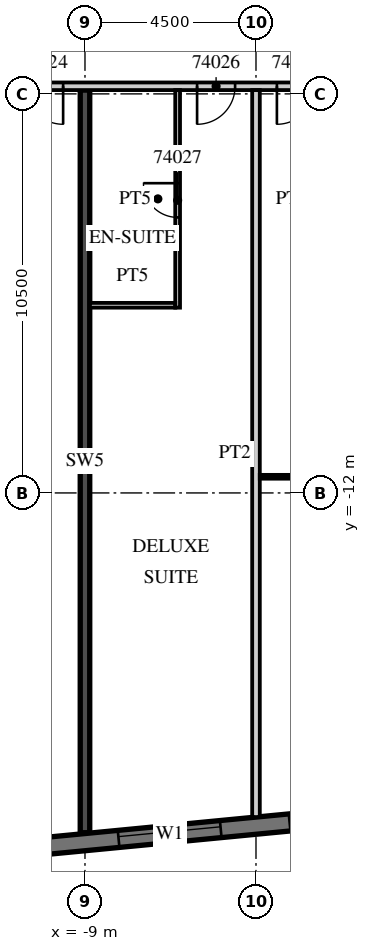
"""IFC4 building model, lengths in metres.
Left out: names, types, materials, properties, quantities, classifications, styles, units other than length and angle.
Written with IfcOpenShell. Run it as: python <this file> out.ifc"""

import sys

from ifc_helpers import new_model, si_unit, direction, frame, frame_2d, origin, place, context, subcontext, project, spatial, rectangle, extrude, element, fill, save


model = new_model("IFC4")
c1 = context("Model", 3, precision=1e-05, world=origin(), true_north=direction((0.0, 1.0)))
c2 = subcontext(c1, "Body", "Model", "MODEL_VIEW")
j1 = project(units=[si_unit("LENGTHUNIT", "METRE"), si_unit("PLANEANGLEUNIT", "RADIAN")], contexts=[c1])
p1 = place(None, origin())
s1 = spatial("IfcSite", under=j1, at=p1, CompositionType="ELEMENT")
p2 = place(p1, origin())
s2 = spatial("IfcBuilding", under=s1, at=p2, CompositionType="ELEMENT")
p3 = place(p2, frame((0.0, 0.0, 294.9)))
s3 = spatial("IfcBuildingStorey", under=s2, at=p3, CompositionType="ELEMENT", Elevation=294.9)
p4 = place(p3, frame((-9.0, -20.94, 0.0), z_axis=(0.0, 0.0, 1.0), x_axis=(0.0, 1.0, 0.0)))
e1 = element("IfcWall", 1, at=p4, inside=s3, PredefinedType="SHEAR", context=c2, shape_type="SweptSolid", body=[
    extrude(rectangle(XDim=19.541, YDim=0.25, at=frame_2d((9.77, 0.0))), origin(), (0.0, 0.0, 1.0), 3.3),
])
p5 = place(p3, frame((-13.521, -21.624, 0.0), z_axis=(0.0, 0.0, 1.0), x_axis=(0.995396186218, 0.095845878695, 0.0)))
e2 = element("IfcWall", 2, at=p5, inside=s3, PredefinedType="SOLIDWALL", context=c2, shape_type="SweptSolid", body=[
    extrude(rectangle(XDim=48.481, YDim=0.45, at=frame_2d((24.241, 0.0))), origin(), (0.0, 0.0, 1.0), 3.02),
])
p6 = place(p5, frame((0.91, 0.0, 0.45)))
e3 = element("IfcOpeningElement", 3, at=p6, cuts=e2, PredefinedType="OPENING", context=c2, shape_type="SweptSolid", body=[
    extrude(rectangle(XDim=2.7, YDim=2.25, at=frame_2d((1.35, 1.125))), frame((0.0, 0.235, 0.0), z_axis=(0.0, -1.0, 0.0), x_axis=(1.0, 0.0, 0.0)), (0.0, 0.0, 1.0), 0.47),
])
p7 = place(p5, frame((5.431, 0.0, 0.45)))
e4 = element("IfcOpeningElement", 4, at=p7, cuts=e2, PredefinedType="OPENING", context=c2, shape_type="SweptSolid", body=[
    extrude(rectangle(XDim=2.7, YDim=2.25, at=frame_2d((1.35, 1.125))), frame((0.0, 0.235, 0.0), z_axis=(0.0, -1.0, 0.0), x_axis=(1.0, 0.0, 0.0)), (0.0, 0.0, 1.0), 0.47),
])
p8 = place(p5, frame((9.952, 0.0, 0.45)))
e5 = element("IfcOpeningElement", 5, at=p8, cuts=e2, PredefinedType="OPENING", context=c2, shape_type="SweptSolid", body=[
    extrude(rectangle(XDim=2.7, YDim=2.25, at=frame_2d((1.35, 1.125))), frame((0.0, 0.235, 0.0), z_axis=(0.0, -1.0, 0.0), x_axis=(1.0, 0.0, 0.0)), (0.0, 0.0, 1.0), 0.47),
])
p9 = place(p5, frame((14.473, 0.0, 0.45)))
e6 = element("IfcOpeningElement", 6, at=p9, cuts=e2, PredefinedType="OPENING", context=c2, shape_type="SweptSolid", body=[
    extrude(rectangle(XDim=2.7, YDim=2.25, at=frame_2d((1.35, 1.125))), frame((0.0, 0.235, 0.0), z_axis=(0.0, -1.0, 0.0), x_axis=(1.0, 0.0, 0.0)), (0.0, 0.0, 1.0), 0.47),
])
p10 = place(p5, frame((18.994, 0.0, 0.45)))
e7 = element("IfcOpeningElement", 7, at=p10, cuts=e2, PredefinedType="OPENING", context=c2, shape_type="SweptSolid", body=[
    extrude(rectangle(XDim=2.7, YDim=2.25, at=frame_2d((1.35, 1.125))), frame((0.0, 0.235, 0.0), z_axis=(0.0, -1.0, 0.0), x_axis=(1.0, 0.0, 0.0)), (0.0, 0.0, 1.0), 0.47),
])
p11 = place(p5, frame((23.514, 0.0, 0.45)))
e8 = element("IfcOpeningElement", 8, at=p11, cuts=e2, PredefinedType="OPENING", context=c2, shape_type="SweptSolid", body=[
    extrude(rectangle(XDim=2.7, YDim=2.25, at=frame_2d((1.35, 1.125))), frame((0.0, 0.235, 0.0), z_axis=(0.0, -1.0, 0.0), x_axis=(1.0, 0.0, 0.0)), (0.0, 0.0, 1.0), 0.47),
])
p12 = place(p5, frame((28.035, 0.0, 0.45)))
e9 = element("IfcOpeningElement", 9, at=p12, cuts=e2, PredefinedType="OPENING", context=c2, shape_type="SweptSolid", body=[
    extrude(rectangle(XDim=2.7, YDim=2.25, at=frame_2d((1.35, 1.125))), frame((0.0, 0.235, 0.0), z_axis=(0.0, -1.0, 0.0), x_axis=(1.0, 0.0, 0.0)), (0.0, 0.0, 1.0), 0.47),
])
p13 = place(p5, frame((32.556, 0.0, 0.45)))
e10 = element("IfcOpeningElement", 10, at=p13, cuts=e2, PredefinedType="OPENING", context=c2, shape_type="SweptSolid", body=[
    extrude(rectangle(XDim=2.7, YDim=2.25, at=frame_2d((1.35, 1.125))), frame((0.0, 0.235, 0.0), z_axis=(0.0, -1.0, 0.0), x_axis=(1.0, 0.0, 0.0)), (0.0, 0.0, 1.0), 0.47),
])
p14 = place(p5, frame((37.077, 0.0, 0.45)))
e11 = element("IfcOpeningElement", 11, at=p14, cuts=e2, PredefinedType="OPENING", context=c2, shape_type="SweptSolid", body=[
    extrude(rectangle(XDim=2.7, YDim=2.25, at=frame_2d((1.35, 1.125))), frame((0.0, 0.235, 0.0), z_axis=(0.0, -1.0, 0.0), x_axis=(1.0, 0.0, 0.0)), (0.0, 0.0, 1.0), 0.47),
])
p15 = place(p5, frame((41.598, 0.0, 0.45)))
e12 = element("IfcOpeningElement", 12, at=p15, cuts=e2, PredefinedType="OPENING", context=c2, shape_type="SweptSolid", body=[
    extrude(rectangle(XDim=2.7, YDim=2.25, at=frame_2d((1.35, 1.125))), frame((0.0, 0.235, 0.0), z_axis=(0.0, -1.0, 0.0), x_axis=(1.0, 0.0, 0.0)), (0.0, 0.0, 1.0), 0.47),
])
p16 = place(p3, frame((-13.5, -1.3, 0.0), z_axis=(0.0, 0.0, 1.0), x_axis=(1.0, 0.0, 0.0)))
e13 = element("IfcWall", 13, at=p16, inside=s3, PredefinedType="PARTITIONING", context=c2, shape_type="SweptSolid", body=[
    extrude(rectangle(XDim=50.293, YDim=0.2, at=frame_2d((25.146, 0.0))), origin(), (0.0, 0.0, 1.0), 3.02),
])
p17 = place(p16, frame((2.925, 0.0, 0.0)))
e14 = element("IfcOpeningElement", 14, at=p17, cuts=e13, PredefinedType="OPENING", context=c2, shape_type="SweptSolid", body=[
    extrude(rectangle(XDim=1.0, YDim=2.1, at=frame_2d((0.5, 1.05))), frame((0.0, 0.11, 0.0), z_axis=(0.0, -1.0, 0.0), x_axis=(1.0, 0.0, 0.0)), (0.0, 0.0, 1.0), 0.22),
])
p18 = place(p16, frame((7.45, 0.0, 0.0)))
e15 = element("IfcOpeningElement", 15, at=p18, cuts=e13, PredefinedType="OPENING", context=c2, shape_type="SweptSolid", body=[
    extrude(rectangle(XDim=1.0, YDim=2.1, at=frame_2d((0.5, 1.05))), frame((0.0, 0.11, 0.0), z_axis=(0.0, -1.0, 0.0), x_axis=(1.0, 0.0, 0.0)), (0.0, 0.0, 1.0), 0.22),
])
p19 = place(p16, frame((9.55, 0.0, 0.0)))
e16 = element("IfcOpeningElement", 16, at=p19, cuts=e13, PredefinedType="OPENING", context=c2, shape_type="SweptSolid", body=[
    extrude(rectangle(XDim=1.0, YDim=2.1, at=frame_2d((0.5, 1.05))), frame((0.0, 0.11, 0.0), z_axis=(0.0, -1.0, 0.0), x_axis=(1.0, 0.0, 0.0)), (0.0, 0.0, 1.0), 0.22),
])
p20 = place(p16, frame((18.862, 0.0, 0.0)))
e17 = element("IfcOpeningElement", 17, at=p20, cuts=e13, PredefinedType="OPENING", context=c2, shape_type="SweptSolid", body=[
    extrude(rectangle(XDim=1.2, YDim=2.1, at=frame_2d((0.6, 1.05))), frame((0.0, 0.11, 0.0), z_axis=(0.0, -1.0, 0.0), x_axis=(1.0, 0.0, 0.0)), (0.0, 0.0, 1.0), 0.22),
])
p21 = place(p16, frame((23.075, 0.0, 0.0)))
e18 = element("IfcOpeningElement", 18, at=p21, cuts=e13, PredefinedType="OPENING", context=c2, shape_type="SweptSolid", body=[
    extrude(rectangle(XDim=1.0, YDim=2.1, at=frame_2d((0.5, 1.05))), frame((0.0, 0.11, 0.0), z_axis=(0.0, -1.0, 0.0), x_axis=(1.0, 0.0, 0.0)), (0.0, 0.0, 1.0), 0.22),
])
p22 = place(p16, frame((29.925, 0.0, 0.0)))
e19 = element("IfcOpeningElement", 19, at=p22, cuts=e13, PredefinedType="OPENING", context=c2, shape_type="SweptSolid", body=[
    extrude(rectangle(XDim=1.0, YDim=2.1, at=frame_2d((0.5, 1.05))), frame((0.0, 0.11, 0.0), z_axis=(0.0, -1.0, 0.0), x_axis=(1.0, 0.0, 0.0)), (0.0, 0.0, 1.0), 0.22),
])
p23 = place(p16, frame((33.938, 0.0, 0.0)))
e20 = element("IfcOpeningElement", 20, at=p23, cuts=e13, PredefinedType="OPENING", context=c2, shape_type="SweptSolid", body=[
    extrude(rectangle(XDim=1.2, YDim=2.1, at=frame_2d((0.6, 1.05))), frame((0.0, 0.11, 0.0), z_axis=(0.0, -1.0, 0.0), x_axis=(1.0, 0.0, 0.0)), (0.0, 0.0, 1.0), 0.22),
])
p24 = place(p16, frame((43.45, 0.0, 0.0)))
e21 = element("IfcOpeningElement", 21, at=p24, cuts=e13, PredefinedType="OPENING", context=c2, shape_type="SweptSolid", body=[
    extrude(rectangle(XDim=1.0, YDim=2.1, at=frame_2d((0.5, 1.05))), frame((0.0, 0.11, 0.0), z_axis=(0.0, -1.0, 0.0), x_axis=(1.0, 0.0, 0.0)), (0.0, 0.0, 1.0), 0.22),
])
p25 = place(p16, frame((45.55, 0.0, 0.0)))
e22 = element("IfcOpeningElement", 22, at=p25, cuts=e13, PredefinedType="OPENING", context=c2, shape_type="SweptSolid", body=[
    extrude(rectangle(XDim=1.0, YDim=2.1, at=frame_2d((0.5, 1.05))), frame((0.0, 0.11, 0.0), z_axis=(0.0, -1.0, 0.0), x_axis=(1.0, 0.0, 0.0)), (0.0, 0.0, 1.0), 0.22),
])
p26 = place(p3, frame((-4.5, -20.529, 0.0), z_axis=(0.0, 0.0, 1.0), x_axis=(0.0, 1.0, 0.0)))
e23 = element("IfcWall", 23, at=p26, inside=s3, PredefinedType="PARTITIONING", context=c2, shape_type="SweptSolid", body=[
    extrude(rectangle(XDim=19.129, YDim=0.2, at=frame_2d((9.564, 0.0))), origin(), (0.0, 0.0, 1.0), 3.02),
])
p27 = place(p3, frame((-6.562, -7.125, 0.0), z_axis=(0.0, 0.0, 1.0), x_axis=(0.0, 1.0, 0.0)))
e24 = element("IfcWall", 24, at=p27, inside=s3, PredefinedType="PARTITIONING", context=c2, shape_type="SweptSolid", body=[
    extrude(rectangle(XDim=5.725, YDim=0.125, at=frame_2d((2.863, 0.0))), origin(), (0.0, 0.0, 1.0), 3.02),
])
p28 = place(p27, frame((2.375, 0.0, 0.0)))
e25 = element("IfcOpeningElement", 25, at=p28, cuts=e24, PredefinedType="OPENING", context=c2, shape_type="SweptSolid", body=[
    extrude(rectangle(XDim=0.9, YDim=2.1, at=frame_2d((0.45, 1.05))), frame((0.0, 0.073, 0.0), z_axis=(0.0, -1.0, 0.0), x_axis=(1.0, 0.0, 0.0)), (0.0, 0.0, 1.0), 0.145),
])
p29 = place(p3, frame((-8.875, -7.062, 0.0), z_axis=(0.0, 0.0, 1.0), x_axis=(1.0, 0.0, 0.0)))
e26 = element("IfcWall", 26, at=p29, inside=s3, PredefinedType="PARTITIONING", context=c2, shape_type="SweptSolid", body=[
    extrude(rectangle(XDim=2.25, YDim=0.125, at=frame_2d((1.125, 0.0))), origin(), (0.0, 0.0, 1.0), 3.02),
])
p30 = place(p3, frame((-4.4, -11.575, 0.0), z_axis=(0.0, 0.0, 1.0), x_axis=(1.0, 0.0, 0.0)))
e27 = element("IfcWall", 27, at=p30, inside=s3, PredefinedType="PARTITIONING", context=c2, shape_type="SweptSolid", body=[
    extrude(rectangle(XDim=4.275, YDim=0.1, at=frame_2d((2.137, 0.0))), origin(), (0.0, 0.0, 1.0), 3.02),
])
p31 = place(p30, frame((1.388, 0.0, 0.0)))
e28 = element("IfcOpeningElement", 28, at=p31, cuts=e27, PredefinedType="OPENING", context=c2, shape_type="SweptSolid", body=[
    extrude(rectangle(XDim=1.5, YDim=2.1, at=frame_2d((0.75, 1.05))), frame((0.0, 0.06, 0.0), z_axis=(0.0, -1.0, 0.0), x_axis=(1.0, 0.0, 0.0)), (0.0, 0.0, 1.0), 0.12),
])
p32 = place(p7, origin())
e29 = element("IfcWindow", 29, at=p32, inside=s3, PartitioningType="SINGLE_PANEL", PredefinedType="WINDOW", context=c2, shape_type="SweptSolid", body=[
    extrude(rectangle(XDim=2.7, YDim=2.25, at=frame_2d((1.35, 1.125))), frame((0.0, 0.09, 0.0), z_axis=(0.0, -1.0, 0.0), x_axis=(1.0, 0.0, 0.0)), (0.0, 0.0, 1.0), 0.06),
])
fill(e4, e29)
p33 = place(p8, origin())
e30 = element("IfcWindow", 30, at=p33, inside=s3, PartitioningType="SINGLE_PANEL", PredefinedType="WINDOW", context=c2, shape_type="SweptSolid", body=[
    extrude(rectangle(XDim=2.7, YDim=2.25, at=frame_2d((1.35, 1.125))), frame((0.0, 0.09, 0.0), z_axis=(0.0, -1.0, 0.0), x_axis=(1.0, 0.0, 0.0)), (0.0, 0.0, 1.0), 0.06),
])
fill(e5, e30)
p34 = place(p17, origin())
e31 = element("IfcDoor", 31, at=p34, inside=s3, OperationType="SINGLE_SWING_RIGHT", PredefinedType="DOOR", context=c2, shape_type="SweptSolid", body=[
    extrude(rectangle(XDim=1.0, YDim=2.1, at=frame_2d((0.5, 1.05))), frame((0.0, 0.025, 0.0), z_axis=(0.0, -1.0, 0.0), x_axis=(1.0, 0.0, 0.0)), (0.0, 0.0, 1.0), 0.05),
])
fill(e14, e31)
p35 = place(p18, origin())
e32 = element("IfcDoor", 32, at=p35, inside=s3, OperationType="SINGLE_SWING_LEFT", PredefinedType="DOOR", context=c2, shape_type="SweptSolid", body=[
    extrude(rectangle(XDim=1.0, YDim=2.1, at=frame_2d((0.5, 1.05))), frame((0.0, 0.025, 0.0), z_axis=(0.0, -1.0, 0.0), x_axis=(1.0, 0.0, 0.0)), (0.0, 0.0, 1.0), 0.05),
])
fill(e15, e32)
p36 = place(p28, origin())
e33 = element("IfcDoor", 33, at=p36, inside=s3, OperationType="SINGLE_SWING_RIGHT", PredefinedType="DOOR", context=c2, shape_type="SweptSolid", body=[
    extrude(rectangle(XDim=0.9, YDim=2.1, at=frame_2d((0.45, 1.05))), frame((0.0, 0.025, 0.0), z_axis=(0.0, -1.0, 0.0), x_axis=(1.0, 0.0, 0.0)), (0.0, 0.0, 1.0), 0.05),
])
fill(e25, e33)
p37 = place(p19, origin())
e34 = element("IfcDoor", 34, at=p37, inside=s3, OperationType="SINGLE_SWING_LEFT", PredefinedType="DOOR", context=c2, shape_type="SweptSolid", body=[
    extrude(rectangle(XDim=1.0, YDim=2.1, at=frame_2d((0.5, 1.05))), frame((0.0, 0.025, 0.0), z_axis=(0.0, -1.0, 0.0), x_axis=(1.0, 0.0, 0.0)), (0.0, 0.0, 1.0), 0.05),
])
fill(e16, e34)
save(model, sys.argv[1])
